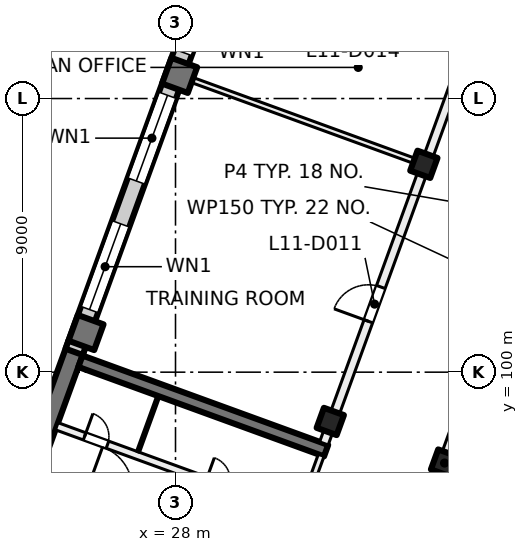
"""IFC4 building model, lengths in metres.
Left out: names, types, materials, properties, quantities, classifications, styles, units other than length and angle.
Written with IfcOpenShell. Run it as: python <this file> out.ifc"""

import sys

from ifc_helpers import new_model, si_unit, direction, frame, frame_2d, origin, origin_2d, place, context, subcontext, project, spatial, rectangle, extrude, element, fill, save


model = new_model("IFC4")
c1 = context("Model", 3, precision=1e-05, world=origin(), true_north=direction((0.0, 1.0)))
c2 = subcontext(c1, "Body", "Model", "MODEL_VIEW")
j1 = project(units=[si_unit("LENGTHUNIT", "METRE"), si_unit("PLANEANGLEUNIT", "RADIAN")], contexts=[c1])
p1 = place(None, origin())
s1 = spatial("IfcSite", under=j1, at=p1, CompositionType="ELEMENT")
p2 = place(p1, origin())
s2 = spatial("IfcBuilding", under=s1, at=p2, CompositionType="ELEMENT")
p3 = place(p2, frame((0.0, 0.0, 51.5)))
s3 = spatial("IfcBuildingStorey", under=s2, at=p3, CompositionType="ELEMENT", Elevation=51.5)
for number, where, z_axis, x_axis in (
    (1, (36.849, 97.011, 0.0), (0.0, 0.0, 1.0), (-0.342, -0.94, 0.0)),
    (2, (36.169, 106.836, 0.0), (0.0, 0.0, 1.0), (-0.342, -0.94, 0.0)),
    (3, (33.091, 98.379, 0.0), (0.0, 0.0, 1.0), (-0.342, -0.94, 0.0)),
):
    element("IfcColumn", number, at=place(p3, frame(where, z_axis=z_axis, x_axis=x_axis)), inside=s3, PredefinedType="COLUMN", context=c2, shape_type="SweptSolid", body=[
        extrude(rectangle(XDim=0.7, YDim=0.7, at=origin_2d()), origin(), (0.0, 0.0, 1.0), 4.0),
    ])
for number, where, z_axis, x_axis in (
    (4, (28.134, 109.76, 0.0), (0.0, 0.0, 1.0), (-0.342, -0.94, 0.0)),
    (5, (25.056, 101.303, 0.0), (0.0, 0.0, 1.0), (-0.342, -0.94, 0.0)),
):
    element("IfcColumn", number, at=place(p3, frame(where, z_axis=z_axis, x_axis=x_axis)), inside=s3, PredefinedType="COLUMN", context=c2, shape_type="SweptSolid", body=[
        extrude(rectangle(XDim=0.9, YDim=0.9, at=origin_2d()), origin(), (0.0, 0.0, 1.0), 4.0),
    ])
p4 = place(p3, frame((21.717, 92.568, 0.0), z_axis=(0.0, 0.0, 1.0), x_axis=(0.342016162452, 0.939694069696, 0.0)))
e6 = element("IfcWall", 6, at=p4, inside=s3, PredefinedType="SHEAR", context=c2, shape_type="SweptSolid", body=[
    extrude(rectangle(XDim=8.9, YDim=0.6, at=frame_2d((4.45, 0.0))), origin(), (0.0, 0.0, 1.0), 4.0),
])
p5 = place(p3, frame((32.953, 97.418, 0.0), z_axis=(0.0, 0.0, 1.0), x_axis=(-0.93969060187, 0.342025690201, 0.0)))
e7 = element("IfcWall", 7, at=p5, inside=s3, PredefinedType="SHEAR", context=c2, shape_type="SweptSolid", body=[
    extrude(rectangle(XDim=8.6, YDim=0.4, at=frame_2d((4.3, 0.0))), origin(), (0.0, 0.0, 1.0), 4.0),
])
p6 = place(p3, frame((24.666, 100.669, 0.0), z_axis=(0.0, 0.0, 1.0), x_axis=(0.34201964167, 0.939692803373, 0.0)))
e8 = element("IfcWall", 8, at=p6, inside=s3, PredefinedType="SOLIDWALL", context=c2, shape_type="SweptSolid", body=[
    extrude(rectangle(XDim=32.884, YDim=0.6, at=frame_2d((16.442, 0.0))), origin(), (0.0, 0.0, 1.0), 3.625),
])
p7 = place(p6, frame((1.48, 0.0, 0.9)))
e9 = element("IfcOpeningElement", 9, at=p7, cuts=e8, PredefinedType="OPENING", context=c2, shape_type="SweptSolid", body=[
    extrude(rectangle(XDim=3.0, YDim=2.4, at=frame_2d((1.5, 1.2))), frame((0.0, 0.31, 0.0), z_axis=(0.0, -1.0, 0.0), x_axis=(1.0, 0.0, 0.0)), (0.0, 0.0, 1.0), 0.62),
])
p8 = place(p6, frame((5.98, 0.0, 0.9)))
e10 = element("IfcOpeningElement", 10, at=p8, cuts=e8, PredefinedType="OPENING", context=c2, shape_type="SweptSolid", body=[
    extrude(rectangle(XDim=3.0, YDim=2.4, at=frame_2d((1.5, 1.2))), frame((0.0, 0.31, 0.0), z_axis=(0.0, -1.0, 0.0), x_axis=(1.0, 0.0, 0.0)), (0.0, 0.0, 1.0), 0.62),
])
p9 = place(p6, frame((10.48, 0.0, 0.9)))
e11 = element("IfcOpeningElement", 11, at=p9, cuts=e8, PredefinedType="OPENING", context=c2, shape_type="SweptSolid", body=[
    extrude(rectangle(XDim=3.0, YDim=2.4, at=frame_2d((1.5, 1.2))), frame((0.0, 0.31, 0.0), z_axis=(0.0, -1.0, 0.0), x_axis=(1.0, 0.0, 0.0)), (0.0, 0.0, 1.0), 0.62),
])
p10 = place(p6, frame((14.98, 0.0, 0.9)))
e12 = element("IfcOpeningElement", 12, at=p10, cuts=e8, PredefinedType="OPENING", context=c2, shape_type="SweptSolid", body=[
    extrude(rectangle(XDim=3.0, YDim=2.4, at=frame_2d((1.5, 1.2))), frame((0.0, 0.31, 0.0), z_axis=(0.0, -1.0, 0.0), x_axis=(1.0, 0.0, 0.0)), (0.0, 0.0, 1.0), 0.62),
])
p11 = place(p6, frame((19.48, 0.0, 0.9)))
e13 = element("IfcOpeningElement", 13, at=p11, cuts=e8, PredefinedType="OPENING", context=c2, shape_type="SweptSolid", body=[
    extrude(rectangle(XDim=3.0, YDim=2.4, at=frame_2d((1.5, 1.2))), frame((0.0, 0.31, 0.0), z_axis=(0.0, -1.0, 0.0), x_axis=(1.0, 0.0, 0.0)), (0.0, 0.0, 1.0), 0.62),
])
p12 = place(p6, frame((23.98, 0.0, 0.9)))
e14 = element("IfcOpeningElement", 14, at=p12, cuts=e8, PredefinedType="OPENING", context=c2, shape_type="SweptSolid", body=[
    extrude(rectangle(XDim=3.0, YDim=2.4, at=frame_2d((1.5, 1.2))), frame((0.0, 0.31, 0.0), z_axis=(0.0, -1.0, 0.0), x_axis=(1.0, 0.0, 0.0)), (0.0, 0.0, 1.0), 0.62),
])
p13 = place(p6, frame((28.48, 0.0, 0.9)))
e15 = element("IfcOpeningElement", 15, at=p13, cuts=e8, PredefinedType="OPENING", context=c2, shape_type="SweptSolid", body=[
    extrude(rectangle(XDim=3.0, YDim=2.4, at=frame_2d((1.5, 1.2))), frame((0.0, 0.31, 0.0), z_axis=(0.0, -1.0, 0.0), x_axis=(1.0, 0.0, 0.0)), (0.0, 0.0, 1.0), 0.62),
])
p14 = place(p3, frame((31.491, 93.693, 0.0), z_axis=(0.0, 0.0, 1.0), x_axis=(0.341995824804, 0.939701471648, 0.0)))
e16 = element("IfcWall", 16, at=p14, inside=s3, PredefinedType="PARTITIONING", context=c2, shape_type="SweptSolid", body=[
    extrude(rectangle(XDim=3.8, YDim=0.2, at=frame_2d((1.9, 0.0))), origin(), (0.0, 0.0, 1.0), 3.625),
])
p15 = place(p14, frame((0.3, 0.0, 0.0)))
e17 = element("IfcOpeningElement", 17, at=p15, cuts=e16, PredefinedType="OPENING", context=c2, shape_type="SweptSolid", body=[
    extrude(rectangle(XDim=1.2, YDim=2.1, at=frame_2d((0.6, 1.05))), frame((0.0, 0.11, 0.0), z_axis=(0.0, -1.0, 0.0), x_axis=(1.0, 0.0, 0.0)), (0.0, 0.0, 1.0), 0.22),
])
p16 = place(p3, frame((23.538, 96.694, 0.0), z_axis=(0.0, 0.0, 1.0), x_axis=(0.939691552312, -0.342023078919, 0.0)))
e18 = element("IfcWall", 18, at=p16, inside=s3, PredefinedType="PARTITIONING", context=c2, shape_type="SweptSolid", body=[
    extrude(rectangle(XDim=8.4, YDim=0.2, at=frame_2d((4.2, 0.0))), origin(), (0.0, 0.0, 1.0), 3.625),
])
p17 = place(p16, frame((1.65, 0.0, 0.0)))
e19 = element("IfcOpeningElement", 19, at=p17, cuts=e18, PredefinedType="OPENING", context=c2, shape_type="SweptSolid", body=[
    extrude(rectangle(XDim=1.5, YDim=2.1, at=frame_2d((0.75, 1.05))), frame((0.0, 0.11, 0.0), z_axis=(0.0, -1.0, 0.0), x_axis=(1.0, 0.0, 0.0)), (0.0, 0.0, 1.0), 0.22),
])
p18 = place(p3, frame((24.094, 98.221, 0.0), z_axis=(0.0, 0.0, 1.0), x_axis=(0.939691552312, -0.342023078919, 0.0)))
e20 = element("IfcWall", 20, at=p18, inside=s3, PredefinedType="PARTITIONING", context=c2, shape_type="SweptSolid", body=[
    extrude(rectangle(XDim=8.4, YDim=0.25, at=frame_2d((4.2, 0.0))), origin(), (0.0, 0.0, 1.0), 3.625),
])
p19 = place(p18, frame((5.225, 0.0, 0.0)))
e21 = element("IfcOpeningElement", 21, at=p19, cuts=e20, PredefinedType="OPENING", context=c2, shape_type="SweptSolid", body=[
    extrude(rectangle(XDim=0.8, YDim=2.1, at=frame_2d((0.4, 1.05))), frame((0.0, 0.135, 0.0), z_axis=(0.0, -1.0, 0.0), x_axis=(1.0, 0.0, 0.0)), (0.0, 0.0, 1.0), 0.27),
])
p20 = place(p18, frame((0.975, 0.0, 0.0)))
e22 = element("IfcOpeningElement", 22, at=p20, cuts=e20, PredefinedType="OPENING", context=c2, shape_type="SweptSolid", body=[
    extrude(rectangle(XDim=0.8, YDim=2.1, at=frame_2d((0.4, 1.05))), frame((0.0, 0.135, 0.0), z_axis=(0.0, -1.0, 0.0), x_axis=(1.0, 0.0, 0.0)), (0.0, 0.0, 1.0), 0.27),
])
p21 = place(p3, frame((26.768, 97.381, 0.0), z_axis=(0.0, 0.0, 1.0), x_axis=(0.342024501273, 0.939691034611, 0.0)))
e23 = element("IfcWall", 23, at=p21, inside=s3, PredefinedType="PARTITIONING", context=c2, shape_type="SweptSolid", body=[
    extrude(rectangle(XDim=1.95, YDim=0.1, at=frame_2d((0.975, 0.0))), origin(), (0.0, 0.0, 1.0), 3.625),
])
p22 = place(p3, frame((28.275, 109.709, 0.0), z_axis=(0.0, 0.0, 1.0), x_axis=(0.939697205528, -0.342007546586, 0.0)))
e24 = element("IfcWall", 24, at=p22, inside=s3, PredefinedType="PARTITIONING", context=c2, shape_type="SweptSolid", body=[
    extrude(rectangle(XDim=8.301, YDim=0.175, at=frame_2d((4.15, 0.0))), origin(), (0.0, 0.0, 1.0), 3.625),
])
p23 = place(p3, frame((32.881, 97.657, 0.0), z_axis=(0.0, 0.0, 1.0), x_axis=(0.342017360004, 0.939693633828, 0.0)))
e25 = element("IfcWall", 25, at=p23, inside=s3, PredefinedType="PARTITIONING", context=c2, shape_type="SweptSolid", body=[
    extrude(rectangle(XDim=34.516, YDim=0.3, at=frame_2d((17.258, 0.0))), origin(), (0.0, 0.0, 1.0), 3.625),
])
p24 = place(p23, frame((4.275, 0.0, 0.0)))
e26 = element("IfcOpeningElement", 26, at=p24, cuts=e25, PredefinedType="OPENING", context=c2, shape_type="SweptSolid", body=[
    extrude(rectangle(XDim=1.2, YDim=2.1, at=frame_2d((0.6, 1.05))), frame((0.0, 0.16, 0.0), z_axis=(0.0, -1.0, 0.0), x_axis=(1.0, 0.0, 0.0)), (0.0, 0.0, 1.0), 0.32),
])
p25 = place(p23, frame((16.0, 0.0, 0.0)))
e27 = element("IfcOpeningElement", 27, at=p25, cuts=e25, PredefinedType="OPENING", context=c2, shape_type="SweptSolid", body=[
    extrude(rectangle(XDim=1.0, YDim=2.1, at=frame_2d((0.5, 1.05))), frame((0.0, 0.16, 0.0), z_axis=(0.0, -1.0, 0.0), x_axis=(1.0, 0.0, 0.0)), (0.0, 0.0, 1.0), 0.32),
])
p26 = place(p23, frame((21.5, 0.0, 0.0)))
e28 = element("IfcOpeningElement", 28, at=p26, cuts=e25, PredefinedType="OPENING", context=c2, shape_type="SweptSolid", body=[
    extrude(rectangle(XDim=1.0, YDim=2.1, at=frame_2d((0.5, 1.05))), frame((0.0, 0.16, 0.0), z_axis=(0.0, -1.0, 0.0), x_axis=(1.0, 0.0, 0.0)), (0.0, 0.0, 1.0), 0.32),
])
p27 = place(p3, frame((44.612, 118.483, 0.0), z_axis=(0.0, 0.0, 1.0), x_axis=(-0.342043123066, -0.939684256526, 0.0)))
e29 = element("IfcWall", 29, at=p27, inside=s3, PredefinedType="PARTITIONING", context=c2, shape_type="SweptSolid", body=[
    extrude(rectangle(XDim=23.582, YDim=0.3, at=frame_2d((11.791, 0.0))), origin(), (0.0, 0.0, 1.0), 3.625),
])
p28 = place(p27, frame((14.932, 0.0, 0.0)))
e30 = element("IfcOpeningElement", 30, at=p28, cuts=e29, PredefinedType="OPENING", context=c2, shape_type="SweptSolid", body=[
    extrude(rectangle(XDim=0.8, YDim=2.1, at=frame_2d((0.4, 1.05))), frame((0.0, 0.16, 0.0), z_axis=(0.0, -1.0, 0.0), x_axis=(1.0, 0.0, 0.0)), (0.0, 0.0, 1.0), 0.32),
])
p29 = place(p27, frame((10.982, 0.0, 0.0)))
e31 = element("IfcOpeningElement", 31, at=p29, cuts=e29, PredefinedType="OPENING", context=c2, shape_type="SweptSolid", body=[
    extrude(rectangle(XDim=1.2, YDim=2.1, at=frame_2d((0.6, 1.05))), frame((0.0, 0.16, 0.0), z_axis=(0.0, -1.0, 0.0), x_axis=(1.0, 0.0, 0.0)), (0.0, 0.0, 1.0), 0.32),
])
p30 = place(p27, frame((19.307, 0.0, 0.0)))
e32 = element("IfcOpeningElement", 32, at=p30, cuts=e29, PredefinedType="OPENING", context=c2, shape_type="SweptSolid", body=[
    extrude(rectangle(XDim=1.8, YDim=2.1, at=frame_2d((0.9, 1.05))), frame((0.0, 0.16, 0.0), z_axis=(0.0, -1.0, 0.0), x_axis=(1.0, 0.0, 0.0)), (0.0, 0.0, 1.0), 0.32),
])
p31 = place(p27, frame((5.756, 0.0, 0.0)))
e33 = element("IfcOpeningElement", 33, at=p31, cuts=e29, PredefinedType="OPENING", context=c2, shape_type="SweptSolid", body=[
    extrude(rectangle(XDim=1.8, YDim=2.1, at=frame_2d((0.9, 1.05))), frame((0.0, 0.16, 0.0), z_axis=(0.0, -1.0, 0.0), x_axis=(1.0, 0.0, 0.0)), (0.0, 0.0, 1.0), 0.32),
])
p32 = place(p7, origin())
e34 = element("IfcWindow", 34, at=p32, inside=s3, PartitioningType="SINGLE_PANEL", PredefinedType="WINDOW", context=c2, shape_type="SweptSolid", body=[
    extrude(rectangle(XDim=3.0, YDim=2.4, at=frame_2d((1.5, 1.2))), frame((0.0, 0.03, 0.0), z_axis=(0.0, -1.0, 0.0), x_axis=(1.0, 0.0, 0.0)), (0.0, 0.0, 1.0), 0.06),
])
fill(e9, e34)
p33 = place(p8, origin())
e35 = element("IfcWindow", 35, at=p33, inside=s3, PartitioningType="SINGLE_PANEL", PredefinedType="WINDOW", context=c2, shape_type="SweptSolid", body=[
    extrude(rectangle(XDim=3.0, YDim=2.4, at=frame_2d((1.5, 1.2))), frame((0.0, 0.03, 0.0), z_axis=(0.0, -1.0, 0.0), x_axis=(1.0, 0.0, 0.0)), (0.0, 0.0, 1.0), 0.06),
])
fill(e10, e35)
p34 = place(p9, origin())
e36 = element("IfcWindow", 36, at=p34, inside=s3, PartitioningType="SINGLE_PANEL", PredefinedType="WINDOW", context=c2, shape_type="SweptSolid", body=[
    extrude(rectangle(XDim=3.0, YDim=2.4, at=frame_2d((1.5, 1.2))), frame((0.0, 0.03, 0.0), z_axis=(0.0, -1.0, 0.0), x_axis=(1.0, 0.0, 0.0)), (0.0, 0.0, 1.0), 0.06),
])
fill(e11, e36)
p35 = place(p20, origin())
e37 = element("IfcDoor", 37, at=p35, inside=s3, OperationType="SINGLE_SWING_RIGHT", PredefinedType="DOOR", context=c2, shape_type="SweptSolid", body=[
    extrude(rectangle(XDim=0.8, YDim=2.1, at=frame_2d((0.4, 1.05))), frame((0.0, 0.025, 0.0), z_axis=(0.0, -1.0, 0.0), x_axis=(1.0, 0.0, 0.0)), (0.0, 0.0, 1.0), 0.05),
])
fill(e22, e37)
p36 = place(p24, origin())
e38 = element("IfcDoor", 38, at=p36, inside=s3, OperationType="DOUBLE_DOOR_SINGLE_SWING", PredefinedType="DOOR", context=c2, shape_type="SweptSolid", body=[
    extrude(rectangle(XDim=1.2, YDim=2.1, at=frame_2d((0.6, 1.05))), frame((0.0, 0.025, 0.0), z_axis=(0.0, -1.0, 0.0), x_axis=(1.0, 0.0, 0.0)), (0.0, 0.0, 1.0), 0.05),
])
fill(e26, e38)
save(model, sys.argv[1])
